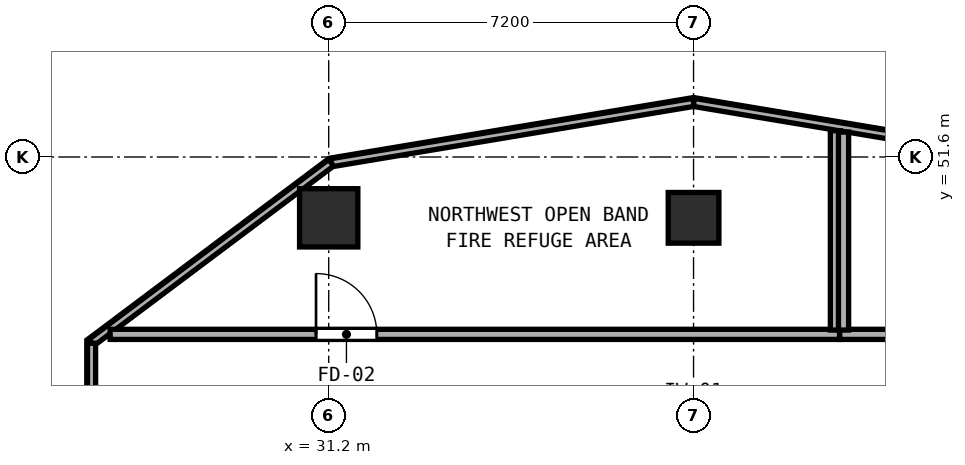
"""IFC4 building model, lengths in metres.
Left out: names, types, materials, properties, quantities, classifications, styles, units other than length and angle.
Written with IfcOpenShell. Run it as: python <this file> out.ifc"""

import sys

from ifc_helpers import new_model, si_unit, direction, frame, frame_2d, origin, origin_2d, place, context, subcontext, project, spatial, rectangle, hollow_rectangle, extrude, element, fill, save


model = new_model("IFC4")
c1 = context("Model", 3, precision=1e-05, world=origin(), true_north=direction((0.0, 1.0)))
c2 = subcontext(c1, "Body", "Model", "MODEL_VIEW")
j1 = project(units=[si_unit("LENGTHUNIT", "METRE"), si_unit("PLANEANGLEUNIT", "RADIAN")], contexts=[c1])
p1 = place(None, origin())
s1 = spatial("IfcSite", under=j1, at=p1, CompositionType="ELEMENT")
p2 = place(p1, origin())
s2 = spatial("IfcBuilding", under=s1, at=p2, CompositionType="ELEMENT")
p3 = place(p2, frame((0.0, 0.0, 89.4)))
s3 = spatial("IfcBuildingStorey", under=s2, at=p3, CompositionType="ELEMENT", Elevation=89.4)
p4 = place(p3, frame((31.2, 50.4, 0.0), z_axis=(0.0, 0.0, 1.0), x_axis=(1.0, 0.0, 0.0)))
e1 = element("IfcColumn", 1, at=p4, inside=s3, PredefinedType="COLUMN", context=c2, shape_type="SweptSolid", body=[
    extrude(hollow_rectangle(XDim=1.15, YDim=1.15, WallThickness=0.042, at=origin_2d()), origin(), (0.0, 0.0, 1.0), 4.6),
])
p5 = place(p3, frame((38.4, 50.4, 0.0), z_axis=(0.0, 0.0, 1.0), x_axis=(1.0, 0.0, 0.0)))
e2 = element("IfcColumn", 2, at=p5, inside=s3, PredefinedType="COLUMN", context=c2, shape_type="SweptSolid", body=[
    extrude(hollow_rectangle(XDim=1.0, YDim=1.0, WallThickness=0.038, at=origin_2d()), origin(), (0.0, 0.0, 1.0), 4.6),
])
p6 = place(p3, frame((45.552, 51.486, 0.0), z_axis=(0.0, 0.0, 1.0), x_axis=(-0.986394833909, 0.164393526752, 0.0)))
e3 = element("IfcWall", 3, at=p6, inside=s3, PredefinedType="PARAPET", context=c2, shape_type="SweptSolid", body=[
    extrude(rectangle(XDim=7.25, YDim=0.16, at=frame_2d((3.625, 0.0))), origin(), (0.0, 0.0, 1.0), 1.15),
])
p7 = place(p3, frame((38.4, 52.678, 0.0), z_axis=(0.0, 0.0, 1.0), x_axis=(-0.986393923832, -0.164398987305, 0.0)))
e4 = element("IfcWall", 4, at=p7, inside=s3, PredefinedType="PARAPET", context=c2, shape_type="SweptSolid", body=[
    extrude(rectangle(XDim=7.25, YDim=0.16, at=frame_2d((3.625, 0.0))), origin(), (0.0, 0.0, 1.0), 1.15),
])
p8 = place(p3, frame((31.249, 51.486, 0.0), z_axis=(0.0, 0.0, 1.0), x_axis=(-0.8, -0.6, 0.0)))
e5 = element("IfcWall", 5, at=p8, inside=s3, PredefinedType="PARAPET", context=c2, shape_type="SweptSolid", body=[
    extrude(rectangle(XDim=5.911, YDim=0.16, at=frame_2d((2.955, 0.0))), origin(), (0.0, 0.0, 1.0), 1.15),
])
p9 = place(p3, frame((26.52, 47.925, 0.0), z_axis=(0.0, 0.0, 1.0), x_axis=(0.0, -1.0, 0.0)))
e6 = element("IfcWall", 6, at=p9, inside=s3, PredefinedType="PARAPET", context=c2, shape_type="SweptSolid", body=[
    extrude(rectangle(XDim=1.245, YDim=0.16, at=frame_2d((0.623, 0.0))), origin(), (0.0, 0.0, 1.0), 1.15),
])
p10 = place(p3, frame((26.887, 48.1, 0.0), z_axis=(0.0, 0.0, 1.0), x_axis=(1.0, 0.0, 0.0)))
e7 = element("IfcWall", 7, at=p10, inside=s3, PredefinedType="SOLIDWALL", context=c2, shape_type="SweptSolid", body=[
    extrude(rectangle(XDim=14.393, YDim=0.2, at=frame_2d((7.197, 0.0))), origin(), (0.0, 0.0, 1.0), 4.35),
])
p11 = place(p10, frame((4.063, 0.0, 0.0)))
e8 = element("IfcOpeningElement", 8, at=p11, cuts=e7, PredefinedType="OPENING", context=c2, shape_type="SweptSolid", body=[
    extrude(rectangle(XDim=1.2, YDim=2.15, at=frame_2d((0.6, 1.075))), frame((0.0, 0.11, 0.0), z_axis=(0.0, -1.0, 0.0), x_axis=(1.0, 0.0, 0.0)), (0.0, 0.0, 1.0), 0.22),
])
p12 = place(p3, frame((41.2, 48.185, 0.0), z_axis=(0.0, 0.0, 1.0), x_axis=(0.0, 1.0, 0.0)))
e9 = element("IfcWall", 9, at=p12, inside=s3, PredefinedType="SOLIDWALL", context=c2, shape_type="SweptSolid", body=[
    extrude(rectangle(XDim=3.933, YDim=0.2, at=frame_2d((1.967, 0.0))), origin(), (0.0, 0.0, 1.0), 4.35),
])
p13 = place(p3, frame((41.285, 48.1, 0.0), z_axis=(0.0, 0.0, 1.0), x_axis=(1.0, 0.0, 0.0)))
e10 = element("IfcWall", 10, at=p13, inside=s3, PredefinedType="SOLIDWALL", context=c2, shape_type="SweptSolid", body=[
    extrude(rectangle(XDim=8.628, YDim=0.2, at=frame_2d((4.314, 0.0))), origin(), (0.0, 0.0, 1.0), 4.35),
])
p14 = place(p13, frame((2.195, 0.0, 0.0)))
e11 = element("IfcOpeningElement", 11, at=p14, cuts=e10, PredefinedType="OPENING", context=c2, shape_type="SweptSolid", body=[
    extrude(rectangle(XDim=1.2, YDim=2.15, at=frame_2d((0.6, 1.075))), frame((0.0, 0.11, 0.0), z_axis=(0.0, -1.0, 0.0), x_axis=(1.0, 0.0, 0.0)), (0.0, 0.0, 1.0), 0.22),
])
p15 = place(p3, frame((41.36, 48.185, 0.0), z_axis=(0.0, 0.0, 1.0), x_axis=(0.0, 1.0, 0.0)))
e12 = element("IfcWall", 12, at=p15, inside=s3, PredefinedType="SOLIDWALL", context=c2, shape_type="SweptSolid", body=[
    extrude(rectangle(XDim=3.907, YDim=0.2, at=frame_2d((1.953, 0.0))), origin(), (0.0, 0.0, 1.0), 4.35),
])
p16 = place(p11, origin())
e13 = element("IfcDoor", 13, at=p16, inside=s3, OperationType="SINGLE_SWING_LEFT", PredefinedType="DOOR", context=c2, shape_type="SweptSolid", body=[
    extrude(rectangle(XDim=1.2, YDim=2.15, at=frame_2d((0.6, 1.075))), frame((0.0, 0.025, 0.0), z_axis=(0.0, -1.0, 0.0), x_axis=(1.0, 0.0, 0.0)), (0.0, 0.0, 1.0), 0.05),
])
fill(e8, e13)
save(model, sys.argv[1])
